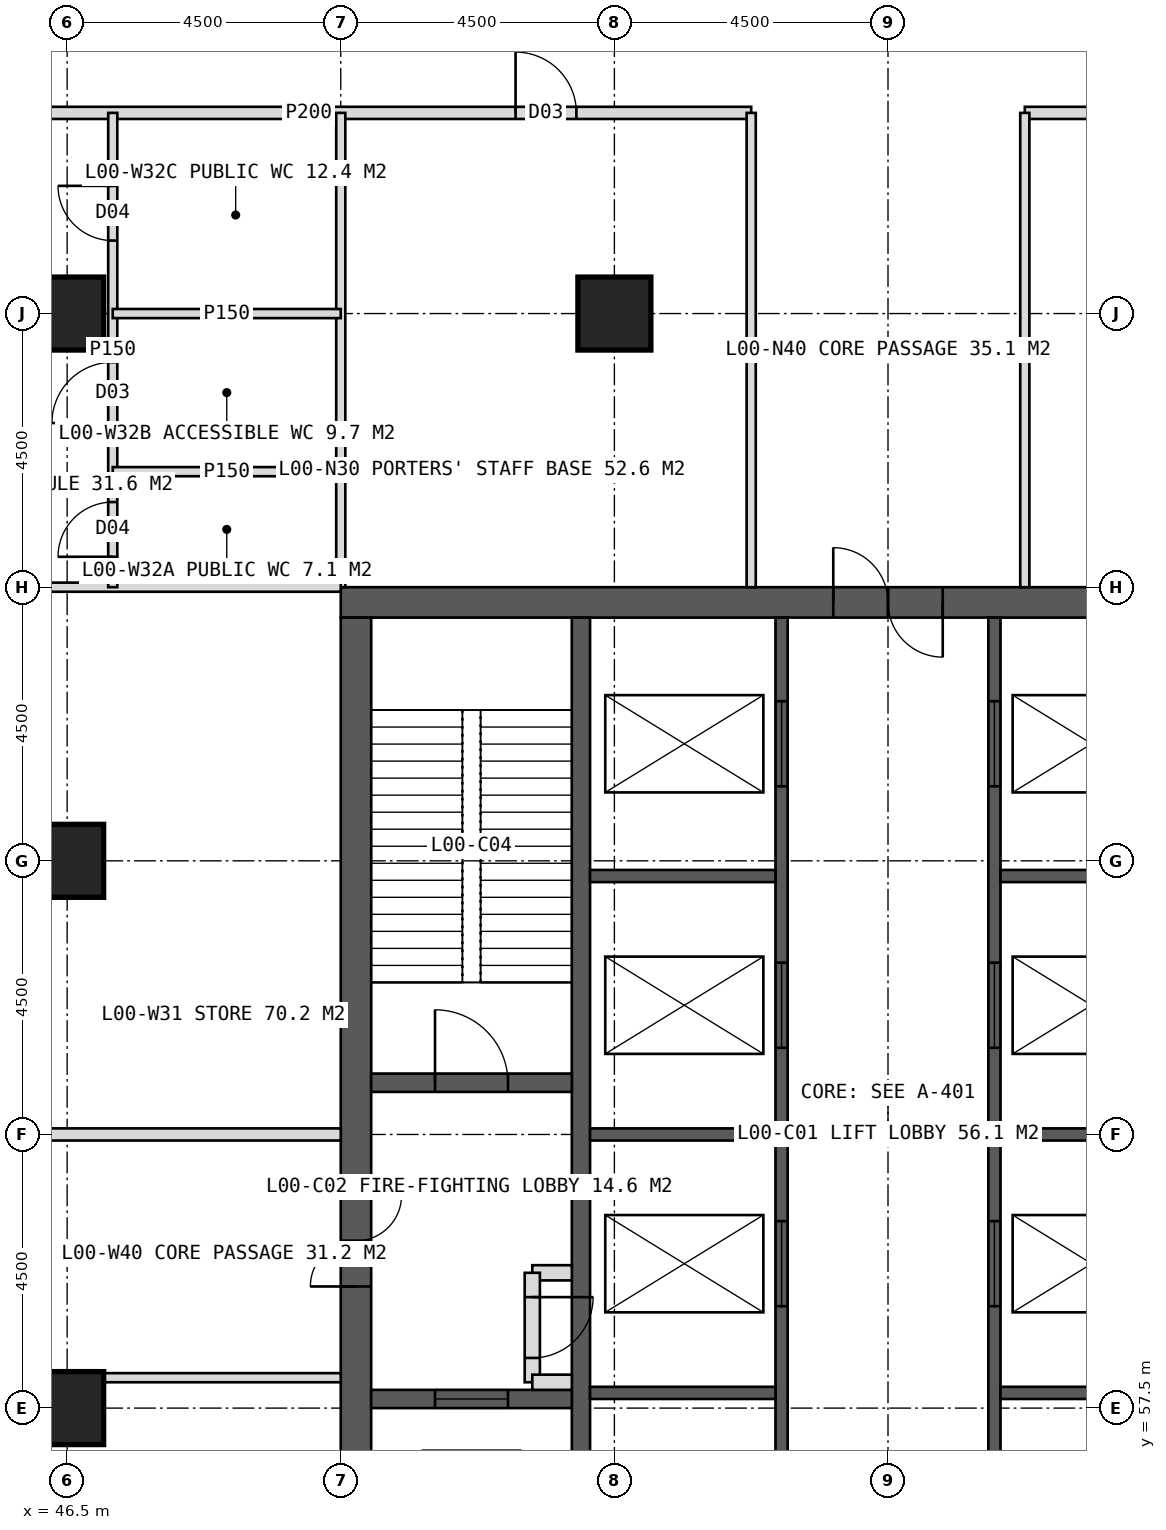
"""IFC4 building model, lengths in metres.
Left out: names, types, materials, properties, quantities, classifications, styles, units other than length and angle.
Written with IfcOpenShell. Run it as: python <this file> out.ifc"""

import sys

from ifc_helpers import new_model, si_unit, direction, frame, frame_2d, origin, origin_2d, place, context, subcontext, project, spatial, rectangle, hollow_rectangle, extrude, element, fill, save


model = new_model("IFC4")
c1 = context("Model", 3, precision=1e-05, world=origin(), true_north=direction((0.0, 1.0)))
c2 = subcontext(c1, "Body", "Model", "MODEL_VIEW")
j1 = project(units=[si_unit("LENGTHUNIT", "METRE"), si_unit("PLANEANGLEUNIT", "RADIAN")], contexts=[c1])
p1 = place(None, origin())
s1 = spatial("IfcSite", under=j1, at=p1, CompositionType="ELEMENT")
p2 = place(p1, origin())
s2 = spatial("IfcBuilding", under=s1, at=p2, CompositionType="ELEMENT")
p3 = place(p2, origin())
s3 = spatial("IfcBuildingStorey", under=s2, at=p3, CompositionType="ELEMENT", Elevation=0.0)
p4 = place(p3, frame((51.0, 70.75, 0.0), z_axis=(0.0, 0.0, 1.0), x_axis=(1.0, 0.0, 0.0)))
e1 = element("IfcWall", 1, at=p4, inside=s3, PredefinedType="SHEAR", context=c2, shape_type="SweptSolid", body=[
    extrude(rectangle(XDim=18.0, YDim=0.5, at=frame_2d((9.0, 0.0))), origin(), (0.0, 0.0, 1.0), 6.0),
])
p5 = place(p4, frame((8.1, 0.0, 0.0)))
e2 = element("IfcOpeningElement", 2, at=p5, cuts=e1, PredefinedType="OPENING", context=c2, shape_type="SweptSolid", body=[
    extrude(rectangle(XDim=1.8, YDim=2.2, at=frame_2d((0.9, 1.1))), frame((0.0, 0.26, 0.0), z_axis=(0.0, -1.0, 0.0), x_axis=(1.0, 0.0, 0.0)), (0.0, 0.0, 1.0), 0.52),
])
p6 = place(p3, frame((51.25, 53.5, 0.0), z_axis=(0.0, 0.0, 1.0), x_axis=(0.0, 1.0, 0.0)))
e3 = element("IfcWall", 3, at=p6, inside=s3, PredefinedType="SHEAR", context=c2, shape_type="SweptSolid", body=[
    extrude(rectangle(XDim=17.0, YDim=0.5, at=frame_2d((8.5, 0.0))), origin(), (0.0, 0.0, 1.0), 6.0),
])
p7 = place(p6, frame((6.0, 0.0, 0.0)))
e4 = element("IfcOpeningElement", 4, at=p7, cuts=e3, PredefinedType="OPENING", context=c2, shape_type="SweptSolid", body=[
    extrude(rectangle(XDim=1.5, YDim=2.2, at=frame_2d((0.75, 1.1))), frame((0.0, 0.26, 0.0), z_axis=(0.0, -1.0, 0.0), x_axis=(1.0, 0.0, 0.0)), (0.0, 0.0, 1.0), 0.52),
])
p8 = place(p3, frame((54.95, 53.5, 0.0), z_axis=(0.0, 0.0, 1.0), x_axis=(0.0, 1.0, 0.0)))
e5 = element("IfcWall", 5, at=p8, inside=s3, PredefinedType="SHEAR", context=c2, shape_type="SweptSolid", body=[
    extrude(rectangle(XDim=17.0, YDim=0.3, at=frame_2d((8.5, 0.0))), origin(), (0.0, 0.0, 1.0), 6.0),
])
p9 = place(p3, frame((58.25, 53.5, 0.0), z_axis=(0.0, 0.0, 1.0), x_axis=(0.0, 1.0, 0.0)))
e6 = element("IfcWall", 6, at=p9, inside=s3, PredefinedType="SHEAR", context=c2, shape_type="SweptSolid", body=[
    extrude(rectangle(XDim=17.0, YDim=0.2, at=frame_2d((8.5, 0.0))), origin(), (0.0, 0.0, 1.0), 6.0),
])
p10 = place(p9, frame((1.375, 0.0, 0.0)))
e7 = element("IfcOpeningElement", 7, at=p10, cuts=e6, PredefinedType="OPENING", context=c2, shape_type="SweptSolid", body=[
    extrude(rectangle(XDim=1.4, YDim=2.2, at=frame_2d((0.7, 1.1))), frame((0.0, 0.11, 0.0), z_axis=(0.0, -1.0, 0.0), x_axis=(1.0, 0.0, 0.0)), (0.0, 0.0, 1.0), 0.22),
])
p11 = place(p9, frame((5.675, 0.0, 0.0)))
e8 = element("IfcOpeningElement", 8, at=p11, cuts=e6, PredefinedType="OPENING", context=c2, shape_type="SweptSolid", body=[
    extrude(rectangle(XDim=1.4, YDim=2.2, at=frame_2d((0.7, 1.1))), frame((0.0, 0.11, 0.0), z_axis=(0.0, -1.0, 0.0), x_axis=(1.0, 0.0, 0.0)), (0.0, 0.0, 1.0), 0.22),
])
p12 = place(p9, frame((9.925, 0.0, 0.0)))
e9 = element("IfcOpeningElement", 9, at=p12, cuts=e6, PredefinedType="OPENING", context=c2, shape_type="SweptSolid", body=[
    extrude(rectangle(XDim=1.4, YDim=2.2, at=frame_2d((0.7, 1.1))), frame((0.0, 0.11, 0.0), z_axis=(0.0, -1.0, 0.0), x_axis=(1.0, 0.0, 0.0)), (0.0, 0.0, 1.0), 0.22),
])
p13 = place(p9, frame((14.225, 0.0, 0.0)))
e10 = element("IfcOpeningElement", 10, at=p13, cuts=e6, PredefinedType="OPENING", context=c2, shape_type="SweptSolid", body=[
    extrude(rectangle(XDim=1.4, YDim=2.2, at=frame_2d((0.7, 1.1))), frame((0.0, 0.11, 0.0), z_axis=(0.0, -1.0, 0.0), x_axis=(1.0, 0.0, 0.0)), (0.0, 0.0, 1.0), 0.22),
])
p14 = place(p3, frame((61.75, 53.5, 0.0), z_axis=(0.0, 0.0, 1.0), x_axis=(0.0, 1.0, 0.0)))
e11 = element("IfcWall", 11, at=p14, inside=s3, PredefinedType="SHEAR", context=c2, shape_type="SweptSolid", body=[
    extrude(rectangle(XDim=17.0, YDim=0.2, at=frame_2d((8.5, 0.0))), origin(), (0.0, 0.0, 1.0), 6.0),
])
p15 = place(p14, frame((1.375, 0.0, 0.0)))
e12 = element("IfcOpeningElement", 12, at=p15, cuts=e11, PredefinedType="OPENING", context=c2, shape_type="SweptSolid", body=[
    extrude(rectangle(XDim=1.4, YDim=2.2, at=frame_2d((0.7, 1.1))), frame((0.0, 0.11, 0.0), z_axis=(0.0, -1.0, 0.0), x_axis=(1.0, 0.0, 0.0)), (0.0, 0.0, 1.0), 0.22),
])
p16 = place(p14, frame((5.675, 0.0, 0.0)))
e13 = element("IfcOpeningElement", 13, at=p16, cuts=e11, PredefinedType="OPENING", context=c2, shape_type="SweptSolid", body=[
    extrude(rectangle(XDim=1.4, YDim=2.2, at=frame_2d((0.7, 1.1))), frame((0.0, 0.11, 0.0), z_axis=(0.0, -1.0, 0.0), x_axis=(1.0, 0.0, 0.0)), (0.0, 0.0, 1.0), 0.22),
])
p17 = place(p14, frame((9.925, 0.0, 0.0)))
e14 = element("IfcOpeningElement", 14, at=p17, cuts=e11, PredefinedType="OPENING", context=c2, shape_type="SweptSolid", body=[
    extrude(rectangle(XDim=1.4, YDim=2.2, at=frame_2d((0.7, 1.1))), frame((0.0, 0.11, 0.0), z_axis=(0.0, -1.0, 0.0), x_axis=(1.0, 0.0, 0.0)), (0.0, 0.0, 1.0), 0.22),
])
p18 = place(p14, frame((14.225, 0.0, 0.0)))
e15 = element("IfcOpeningElement", 15, at=p18, cuts=e11, PredefinedType="OPENING", context=c2, shape_type="SweptSolid", body=[
    extrude(rectangle(XDim=1.4, YDim=2.2, at=frame_2d((0.7, 1.1))), frame((0.0, 0.11, 0.0), z_axis=(0.0, -1.0, 0.0), x_axis=(1.0, 0.0, 0.0)), (0.0, 0.0, 1.0), 0.22),
])
for number, where, z_axis, x_axis in (
    (16, (55.1, 57.75, 0.0), (0.0, 0.0, 1.0), (1.0, 0.0, 0.0)),
    (17, (61.85, 57.75, 0.0), (0.0, 0.0, 1.0), (1.0, 0.0, 0.0)),
    (18, (55.1, 62.0, 0.0), (0.0, 0.0, 1.0), (1.0, 0.0, 0.0)),
    (19, (61.85, 62.0, 0.0), (0.0, 0.0, 1.0), (1.0, 0.0, 0.0)),
    (20, (55.1, 66.25, 0.0), (0.0, 0.0, 1.0), (1.0, 0.0, 0.0)),
    (21, (61.85, 66.25, 0.0), (0.0, 0.0, 1.0), (1.0, 0.0, 0.0)),
):
    element("IfcWall", number, at=place(p3, frame(where, z_axis=z_axis, x_axis=x_axis)), inside=s3, PredefinedType="SHEAR", context=c2, shape_type="SweptSolid", body=[
        extrude(rectangle(XDim=3.05, YDim=0.2, at=frame_2d((1.525, 0.0))), origin(), (0.0, 0.0, 1.0), 6.0),
    ])
p19 = place(p3, frame((51.5, 62.85, 0.0), z_axis=(0.0, 0.0, 1.0), x_axis=(1.0, 0.0, 0.0)))
e22 = element("IfcWall", 22, at=p19, inside=s3, PredefinedType="SHEAR", context=c2, shape_type="SweptSolid", body=[
    extrude(rectangle(XDim=3.3, YDim=0.3, at=frame_2d((1.65, 0.0))), origin(), (0.0, 0.0, 1.0), 6.0),
])
p20 = place(p19, frame((1.05, 0.0, 0.0)))
e23 = element("IfcOpeningElement", 23, at=p20, cuts=e22, PredefinedType="OPENING", context=c2, shape_type="SweptSolid", body=[
    extrude(rectangle(XDim=1.2, YDim=2.1, at=frame_2d((0.6, 1.05))), frame((0.0, 0.16, 0.0), z_axis=(0.0, -1.0, 0.0), x_axis=(1.0, 0.0, 0.0)), (0.0, 0.0, 1.0), 0.32),
])
p21 = place(p3, frame((51.5, 57.65, 0.0), z_axis=(0.0, 0.0, 1.0), x_axis=(1.0, 0.0, 0.0)))
e24 = element("IfcWall", 24, at=p21, inside=s3, PredefinedType="SHEAR", context=c2, shape_type="SweptSolid", body=[
    extrude(rectangle(XDim=3.3, YDim=0.3, at=frame_2d((1.65, 0.0))), origin(), (0.0, 0.0, 1.0), 6.0),
])
p22 = place(p21, frame((1.05, 0.0, 0.0)))
e25 = element("IfcOpeningElement", 25, at=p22, cuts=e24, PredefinedType="OPENING", context=c2, shape_type="SweptSolid", body=[
    extrude(rectangle(XDim=1.2, YDim=2.2, at=frame_2d((0.6, 1.1))), frame((0.0, 0.16, 0.0), z_axis=(0.0, -1.0, 0.0), x_axis=(1.0, 0.0, 0.0)), (0.0, 0.0, 1.0), 0.32),
])
for number, where, z_axis, x_axis in (
    (26, (46.5, 75.5, 0.0), (0.0, 0.0, 1.0), (1.0, 0.0, 0.0)),
    (27, (55.5, 75.5, 0.0), (0.0, 0.0, 1.0), (1.0, 0.0, 0.0)),
    (28, (46.5, 57.5, 0.0), (0.0, 0.0, 1.0), (1.0, 0.0, 0.0)),
    (29, (46.5, 66.5, 0.0), (0.0, 0.0, 1.0), (1.0, 0.0, 0.0)),
):
    element("IfcColumn", number, at=place(p3, frame(where, z_axis=z_axis, x_axis=x_axis)), inside=s3, PredefinedType="COLUMN", context=c2, shape_type="SweptSolid", body=[
        extrude(hollow_rectangle(XDim=1.2, YDim=1.2, WallThickness=0.1, at=origin_2d()), origin(), (0.0, 0.0, 1.0), 6.0),
    ])
p23 = place(p3, frame((43.2, 78.8, 0.0), z_axis=(0.0, 0.0, 1.0), x_axis=(1.0, 0.0, 0.0)))
e30 = element("IfcWall", 30, at=p23, inside=s3, PredefinedType="PARTITIONING", context=c2, shape_type="SweptSolid", body=[
    extrude(rectangle(XDim=14.55, YDim=0.2, at=frame_2d((7.275, 0.0))), origin(), (0.0, 0.0, 1.0), 5.7),
])
p24 = place(p23, frame((10.675, 0.0, 0.0)))
e31 = element("IfcOpeningElement", 31, at=p24, cuts=e30, PredefinedType="OPENING", context=c2, shape_type="SweptSolid", body=[
    extrude(rectangle(XDim=1.0, YDim=2.1, at=frame_2d((0.5, 1.05))), frame((0.0, 0.11, 0.0), z_axis=(0.0, -1.0, 0.0), x_axis=(1.0, 0.0, 0.0)), (0.0, 0.0, 1.0), 0.22),
])
p25 = place(p3, frame((62.25, 78.8, 0.0), z_axis=(0.0, 0.0, 1.0), x_axis=(1.0, 0.0, 0.0)))
e32 = element("IfcWall", 32, at=p25, inside=s3, PredefinedType="PARTITIONING", context=c2, shape_type="SweptSolid", body=[
    extrude(rectangle(XDim=6.75, YDim=0.2, at=frame_2d((3.375, 0.0))), origin(), (0.0, 0.0, 1.0), 5.7),
])
p26 = place(p25, frame((2.875, 0.0, 0.0)))
e33 = element("IfcOpeningElement", 33, at=p26, cuts=e32, PredefinedType="OPENING", context=c2, shape_type="SweptSolid", body=[
    extrude(rectangle(XDim=1.0, YDim=2.1, at=frame_2d((0.5, 1.05))), frame((0.0, 0.11, 0.0), z_axis=(0.0, -1.0, 0.0), x_axis=(1.0, 0.0, 0.0)), (0.0, 0.0, 1.0), 0.22),
])
for number, where, z_axis, x_axis in (
    (34, (51.0, 71.0, 0.0), (0.0, 0.0, 1.0), (0.0, 1.0, 0.0)),
    (35, (57.75, 71.0, 0.0), (0.0, 0.0, 1.0), (0.0, 1.0, 0.0)),
    (36, (62.25, 71.0, 0.0), (0.0, 0.0, 1.0), (0.0, 1.0, 0.0)),
):
    element("IfcWall", number, at=place(p3, frame(where, z_axis=z_axis, x_axis=x_axis)), inside=s3, PredefinedType="PARTITIONING", context=c2, shape_type="SweptSolid", body=[
        extrude(rectangle(XDim=7.8, YDim=0.15, at=frame_2d((3.9, 0.0))), origin(), (0.0, 0.0, 1.0), 5.7),
    ])
p27 = place(p3, frame((51.0, 58.0, 0.0), z_axis=(0.0, 0.0, 1.0), x_axis=(-1.0, 0.0, 0.0)))
e37 = element("IfcWall", 37, at=p27, inside=s3, PredefinedType="PARTITIONING", context=c2, shape_type="SweptSolid", body=[
    extrude(rectangle(XDim=3.9, YDim=0.15, at=frame_2d((1.95, 0.0))), origin(), (0.0, 0.0, 1.0), 5.7),
])
p28 = place(p3, frame((51.0, 62.0, 0.0), z_axis=(0.0, 0.0, 1.0), x_axis=(-1.0, 0.0, 0.0)))
e38 = element("IfcWall", 38, at=p28, inside=s3, PredefinedType="SOLIDWALL", context=c2, shape_type="SweptSolid", body=[
    extrude(rectangle(XDim=7.8, YDim=0.2, at=frame_2d((3.9, 0.0))), origin(), (0.0, 0.0, 1.0), 4.9),
])
p29 = place(p3, frame((51.0, 71.0, 0.0), z_axis=(0.0, 0.0, 1.0), x_axis=(-1.0, 0.0, 0.0)))
e39 = element("IfcWall", 39, at=p29, inside=s3, PredefinedType="PARTITIONING", context=c2, shape_type="SweptSolid", body=[
    extrude(rectangle(XDim=7.8, YDim=0.15, at=frame_2d((3.9, 0.0))), origin(), (0.0, 0.0, 1.0), 5.7),
])
p30 = place(p3, frame((47.25, 71.0, 0.0), z_axis=(0.0, 0.0, 1.0), x_axis=(0.0, 1.0, 0.0)))
e40 = element("IfcWall", 40, at=p30, inside=s3, PredefinedType="PARTITIONING", context=c2, shape_type="SweptSolid", body=[
    extrude(rectangle(XDim=7.8, YDim=0.15, at=frame_2d((3.9, 0.0))), origin(), (0.0, 0.0, 1.0), 5.7),
])
p31 = place(p30, frame((0.5, 0.0, 0.0)))
e41 = element("IfcOpeningElement", 41, at=p31, cuts=e40, PredefinedType="OPENING", context=c2, shape_type="SweptSolid", body=[
    extrude(rectangle(XDim=0.9, YDim=2.1, at=frame_2d((0.45, 1.05))), frame((0.0, 0.085, 0.0), z_axis=(0.0, -1.0, 0.0), x_axis=(1.0, 0.0, 0.0)), (0.0, 0.0, 1.0), 0.17),
])
p32 = place(p30, frame((2.7, 0.0, 0.0)))
e42 = element("IfcOpeningElement", 42, at=p32, cuts=e40, PredefinedType="OPENING", context=c2, shape_type="SweptSolid", body=[
    extrude(rectangle(XDim=1.0, YDim=2.1, at=frame_2d((0.5, 1.05))), frame((0.0, 0.085, 0.0), z_axis=(0.0, -1.0, 0.0), x_axis=(1.0, 0.0, 0.0)), (0.0, 0.0, 1.0), 0.17),
])
p33 = place(p30, frame((5.7, 0.0, 0.0)))
e43 = element("IfcOpeningElement", 43, at=p33, cuts=e40, PredefinedType="OPENING", context=c2, shape_type="SweptSolid", body=[
    extrude(rectangle(XDim=0.9, YDim=2.1, at=frame_2d((0.45, 1.05))), frame((0.0, 0.085, 0.0), z_axis=(0.0, -1.0, 0.0), x_axis=(1.0, 0.0, 0.0)), (0.0, 0.0, 1.0), 0.17),
])
p34 = place(p3, frame((51.0, 72.9, 0.0), z_axis=(0.0, 0.0, 1.0), x_axis=(-1.0, 0.0, 0.0)))
e44 = element("IfcWall", 44, at=p34, inside=s3, PredefinedType="PARTITIONING", context=c2, shape_type="SweptSolid", body=[
    extrude(rectangle(XDim=3.75, YDim=0.15, at=frame_2d((1.875, 0.0))), origin(), (0.0, 0.0, 1.0), 5.7),
])
p35 = place(p3, frame((51.0, 75.5, 0.0), z_axis=(0.0, 0.0, 1.0), x_axis=(-1.0, 0.0, 0.0)))
e45 = element("IfcWall", 45, at=p35, inside=s3, PredefinedType="PARTITIONING", context=c2, shape_type="SweptSolid", body=[
    extrude(rectangle(XDim=3.75, YDim=0.15, at=frame_2d((1.875, 0.0))), origin(), (0.0, 0.0, 1.0), 4.9),
])
p36 = place(p3, frame((54.8, 59.725, 0.0), z_axis=(0.0, 0.0, 1.0), x_axis=(-1.0, 0.0, 0.0)))
e46 = element("IfcWall", 46, at=p36, inside=s3, PredefinedType="SOLIDWALL", context=c2, shape_type="SweptSolid", body=[
    extrude(rectangle(XDim=0.65, YDim=0.25, at=frame_2d((0.325, 0.0))), origin(), (0.0, 0.0, 1.0), 5.7),
])
p37 = place(p3, frame((54.15, 59.725, 0.0), z_axis=(0.0, 0.0, 1.0), x_axis=(0.0, -1.0, 0.0)))
e47 = element("IfcWall", 47, at=p37, inside=s3, PredefinedType="SOLIDWALL", context=c2, shape_type="SweptSolid", body=[
    extrude(rectangle(XDim=1.8, YDim=0.25, at=frame_2d((0.9, 0.0))), origin(), (0.0, 0.0, 1.0), 5.7),
])
p38 = place(p37, frame((0.4, 0.0, 0.0)))
e48 = element("IfcOpeningElement", 48, at=p38, cuts=e47, PredefinedType="OPENING", context=c2, shape_type="SweptSolid", body=[
    extrude(rectangle(XDim=1.0, YDim=2.1, at=frame_2d((0.5, 1.05))), frame((0.0, 0.135, 0.0), z_axis=(0.0, -1.0, 0.0), x_axis=(1.0, 0.0, 0.0)), (0.0, 0.0, 1.0), 0.27),
])
p39 = place(p3, frame((54.15, 57.925, 0.0), z_axis=(0.0, 0.0, 1.0), x_axis=(1.0, 0.0, 0.0)))
e49 = element("IfcWall", 49, at=p39, inside=s3, PredefinedType="SOLIDWALL", context=c2, shape_type="SweptSolid", body=[
    extrude(rectangle(XDim=0.65, YDim=0.25, at=frame_2d((0.325, 0.0))), origin(), (0.0, 0.0, 1.0), 5.7),
])
p40 = place(p24, origin())
e50 = element("IfcDoor", 50, at=p40, inside=s3, OperationType="SINGLE_SWING_LEFT", PredefinedType="DOOR", context=c2, shape_type="SweptSolid", body=[
    extrude(rectangle(XDim=1.0, YDim=2.1, at=frame_2d((0.5, 1.05))), frame((0.0, 0.025, 0.0), z_axis=(0.0, -1.0, 0.0), x_axis=(1.0, 0.0, 0.0)), (0.0, 0.0, 1.0), 0.05),
])
fill(e31, e50)
p41 = place(p5, origin())
e51 = element("IfcDoor", 51, at=p41, inside=s3, OperationType="DOUBLE_DOOR_SINGLE_SWING", PredefinedType="DOOR", context=c2, shape_type="SweptSolid", body=[
    extrude(rectangle(XDim=1.8, YDim=2.2, at=frame_2d((0.9, 1.1))), frame((0.0, 0.025, 0.0), z_axis=(0.0, -1.0, 0.0), x_axis=(1.0, 0.0, 0.0)), (0.0, 0.0, 1.0), 0.05),
])
fill(e2, e51)
p42 = place(p7, origin())
e52 = element("IfcDoor", 52, at=p42, inside=s3, OperationType="DOUBLE_DOOR_SINGLE_SWING", PredefinedType="DOOR", context=c2, shape_type="SweptSolid", body=[
    extrude(rectangle(XDim=1.5, YDim=2.2, at=frame_2d((0.75, 1.1))), frame((0.0, 0.025, 0.0), z_axis=(0.0, -1.0, 0.0), x_axis=(1.0, 0.0, 0.0)), (0.0, 0.0, 1.0), 0.05),
])
fill(e4, e52)
p43 = place(p20, origin())
e53 = element("IfcDoor", 53, at=p43, inside=s3, OperationType="SINGLE_SWING_LEFT", PredefinedType="DOOR", context=c2, shape_type="SweptSolid", body=[
    extrude(rectangle(XDim=1.2, YDim=2.1, at=frame_2d((0.6, 1.05))), frame((0.0, 0.025, 0.0), z_axis=(0.0, -1.0, 0.0), x_axis=(1.0, 0.0, 0.0)), (0.0, 0.0, 1.0), 0.05),
])
fill(e23, e53)
p44 = place(p22, origin())
e54 = element("IfcDoor", 54, at=p44, inside=s3, OperationType="SLIDING_TO_LEFT", PredefinedType="DOOR", context=c2, shape_type="SweptSolid", body=[
    extrude(rectangle(XDim=1.2, YDim=2.2, at=frame_2d((0.6, 1.1))), frame((0.0, 0.025, 0.0), z_axis=(0.0, -1.0, 0.0), x_axis=(1.0, 0.0, 0.0)), (0.0, 0.0, 1.0), 0.05),
])
fill(e25, e54)
p45 = place(p11, origin())
e55 = element("IfcDoor", 55, at=p45, inside=s3, OperationType="SLIDING_TO_LEFT", PredefinedType="DOOR", context=c2, shape_type="SweptSolid", body=[
    extrude(rectangle(XDim=1.4, YDim=2.2, at=frame_2d((0.7, 1.1))), frame((0.0, 0.025, 0.0), z_axis=(0.0, -1.0, 0.0), x_axis=(1.0, 0.0, 0.0)), (0.0, 0.0, 1.0), 0.05),
])
fill(e8, e55)
p46 = place(p16, origin())
e56 = element("IfcDoor", 56, at=p46, inside=s3, OperationType="SLIDING_TO_LEFT", PredefinedType="DOOR", context=c2, shape_type="SweptSolid", body=[
    extrude(rectangle(XDim=1.4, YDim=2.2, at=frame_2d((0.7, 1.1))), frame((0.0, 0.025, 0.0), z_axis=(0.0, -1.0, 0.0), x_axis=(1.0, 0.0, 0.0)), (0.0, 0.0, 1.0), 0.05),
])
fill(e13, e56)
p47 = place(p12, origin())
e57 = element("IfcDoor", 57, at=p47, inside=s3, OperationType="SLIDING_TO_LEFT", PredefinedType="DOOR", context=c2, shape_type="SweptSolid", body=[
    extrude(rectangle(XDim=1.4, YDim=2.2, at=frame_2d((0.7, 1.1))), frame((0.0, 0.025, 0.0), z_axis=(0.0, -1.0, 0.0), x_axis=(1.0, 0.0, 0.0)), (0.0, 0.0, 1.0), 0.05),
])
fill(e9, e57)
p48 = place(p17, origin())
e58 = element("IfcDoor", 58, at=p48, inside=s3, OperationType="SLIDING_TO_LEFT", PredefinedType="DOOR", context=c2, shape_type="SweptSolid", body=[
    extrude(rectangle(XDim=1.4, YDim=2.2, at=frame_2d((0.7, 1.1))), frame((0.0, 0.025, 0.0), z_axis=(0.0, -1.0, 0.0), x_axis=(1.0, 0.0, 0.0)), (0.0, 0.0, 1.0), 0.05),
])
fill(e14, e58)
p49 = place(p13, origin())
e59 = element("IfcDoor", 59, at=p49, inside=s3, OperationType="SLIDING_TO_LEFT", PredefinedType="DOOR", context=c2, shape_type="SweptSolid", body=[
    extrude(rectangle(XDim=1.4, YDim=2.2, at=frame_2d((0.7, 1.1))), frame((0.0, 0.025, 0.0), z_axis=(0.0, -1.0, 0.0), x_axis=(1.0, 0.0, 0.0)), (0.0, 0.0, 1.0), 0.05),
])
fill(e10, e59)
p50 = place(p18, origin())
e60 = element("IfcDoor", 60, at=p50, inside=s3, OperationType="SLIDING_TO_LEFT", PredefinedType="DOOR", context=c2, shape_type="SweptSolid", body=[
    extrude(rectangle(XDim=1.4, YDim=2.2, at=frame_2d((0.7, 1.1))), frame((0.0, 0.025, 0.0), z_axis=(0.0, -1.0, 0.0), x_axis=(1.0, 0.0, 0.0)), (0.0, 0.0, 1.0), 0.05),
])
fill(e15, e60)
p51 = place(p38, origin())
e61 = element("IfcDoor", 61, at=p51, inside=s3, OperationType="SINGLE_SWING_LEFT", PredefinedType="DOOR", context=c2, shape_type="SweptSolid", body=[
    extrude(rectangle(XDim=1.0, YDim=2.1, at=frame_2d((0.5, 1.05))), frame((0.0, 0.025, 0.0), z_axis=(0.0, -1.0, 0.0), x_axis=(1.0, 0.0, 0.0)), (0.0, 0.0, 1.0), 0.05),
])
fill(e48, e61)
p52 = place(p31, origin())
e62 = element("IfcDoor", 62, at=p52, inside=s3, OperationType="SINGLE_SWING_LEFT", PredefinedType="DOOR", context=c2, shape_type="SweptSolid", body=[
    extrude(rectangle(XDim=0.9, YDim=2.1, at=frame_2d((0.45, 1.05))), frame((0.0, 0.025, 0.0), z_axis=(0.0, -1.0, 0.0), x_axis=(1.0, 0.0, 0.0)), (0.0, 0.0, 1.0), 0.05),
])
fill(e41, e62)
p53 = place(p32, origin())
e63 = element("IfcDoor", 63, at=p53, inside=s3, OperationType="SINGLE_SWING_LEFT", PredefinedType="DOOR", context=c2, shape_type="SweptSolid", body=[
    extrude(rectangle(XDim=1.0, YDim=2.1, at=frame_2d((0.5, 1.05))), frame((0.0, 0.025, 0.0), z_axis=(0.0, -1.0, 0.0), x_axis=(1.0, 0.0, 0.0)), (0.0, 0.0, 1.0), 0.05),
])
fill(e42, e63)
p54 = place(p33, origin())
e64 = element("IfcDoor", 64, at=p54, inside=s3, OperationType="SINGLE_SWING_RIGHT", PredefinedType="DOOR", context=c2, shape_type="SweptSolid", body=[
    extrude(rectangle(XDim=0.9, YDim=2.1, at=frame_2d((0.45, 1.05))), frame((0.0, 0.025, 0.0), z_axis=(0.0, -1.0, 0.0), x_axis=(1.0, 0.0, 0.0)), (0.0, 0.0, 1.0), 0.05),
])
fill(e43, e64)
save(model, sys.argv[1])
